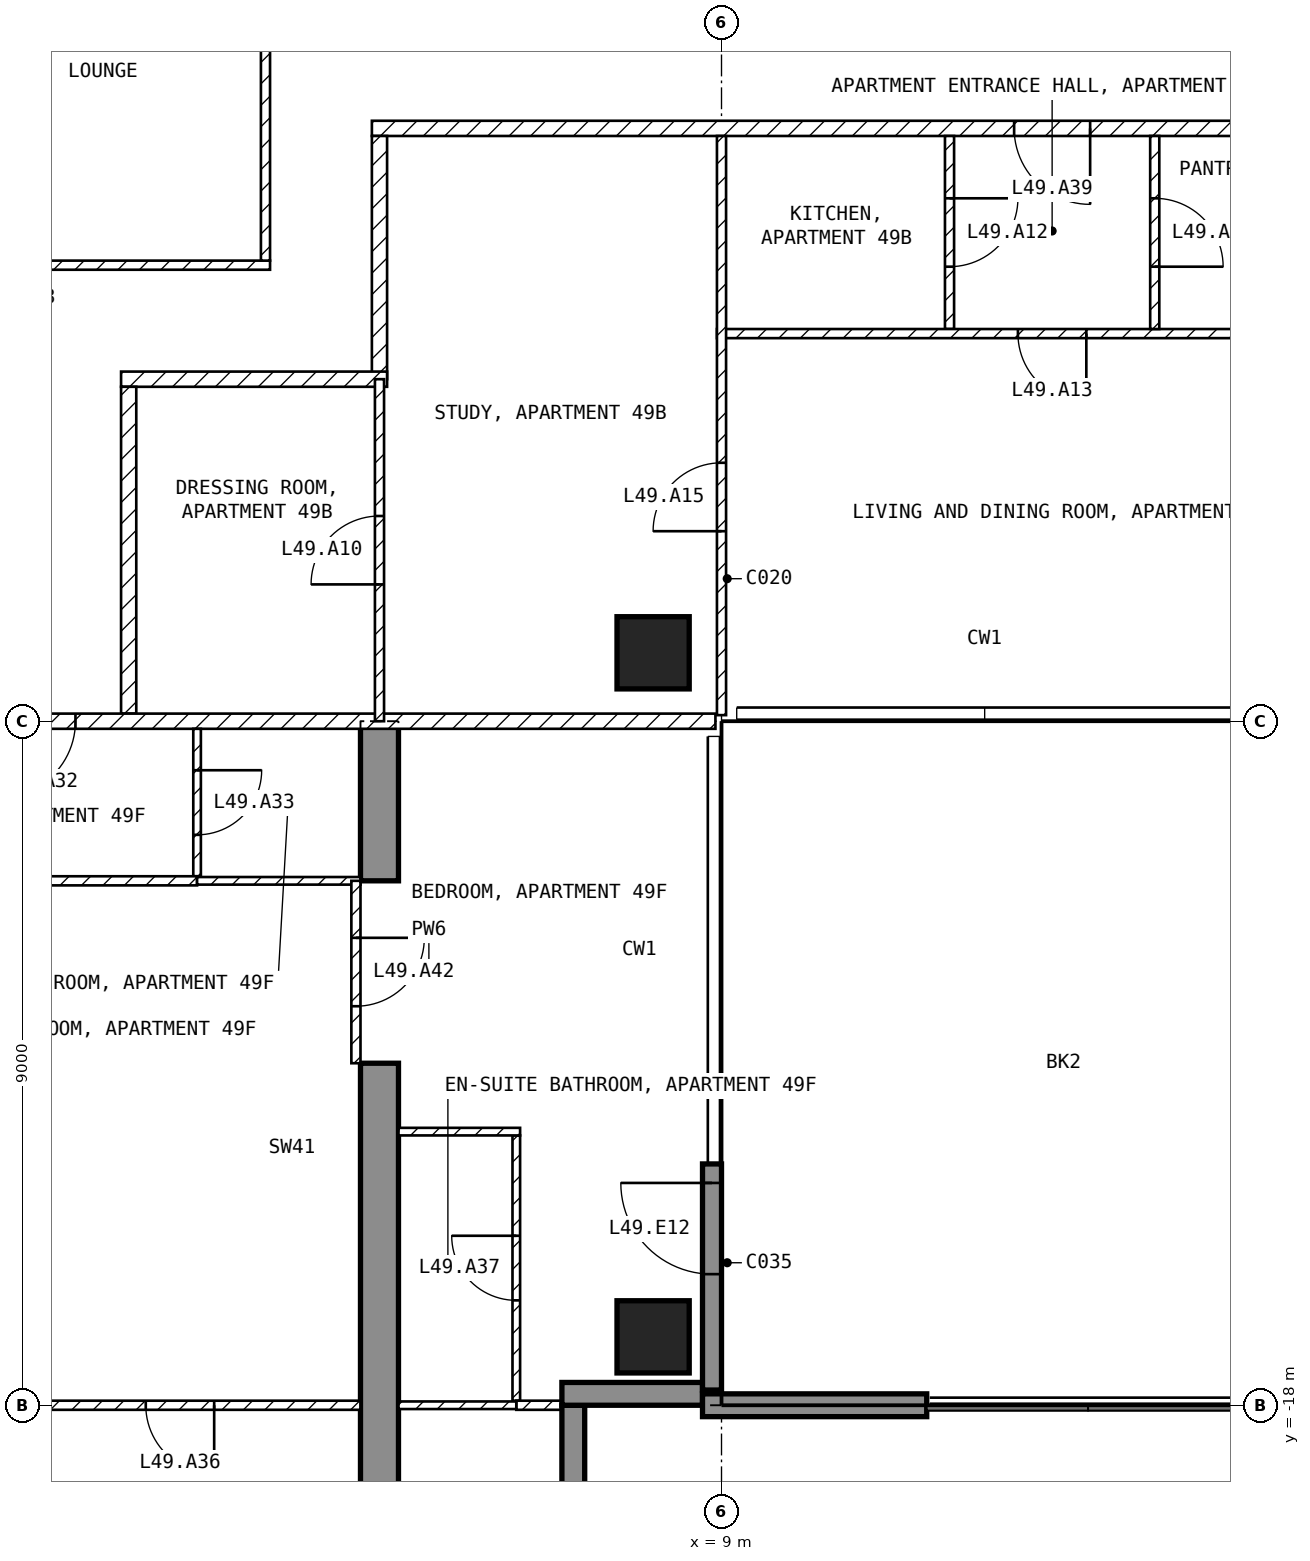
"""IFC4 building model, lengths in metres.
Left out: names, types, materials, properties, quantities, classifications, styles, units other than length and angle.
Written with IfcOpenShell. Run it as: python <this file> out.ifc"""

import sys

from ifc_helpers import new_model, si_unit, direction, frame, frame_2d, origin, origin_2d, place, context, subcontext, project, spatial, polyline, rectangle, outline, extrude, element, fill, save


model = new_model("IFC4")
c1 = context("Model", 3, precision=1e-05, world=origin(), true_north=direction((0.0, 1.0)))
c2 = subcontext(c1, "Body", "Model", "MODEL_VIEW")
j1 = project(units=[si_unit("LENGTHUNIT", "METRE"), si_unit("PLANEANGLEUNIT", "RADIAN")], contexts=[c1])
p1 = place(None, origin())
s1 = spatial("IfcSite", under=j1, at=p1, CompositionType="ELEMENT")
p2 = place(p1, origin())
s2 = spatial("IfcBuilding", under=s1, at=p2, CompositionType="ELEMENT")
p3 = place(p2, frame((0.0, 0.0, 198.1)))
s3 = spatial("IfcBuildingStorey", under=s2, at=p3, CompositionType="ELEMENT", Elevation=198.1)
for number, where, z_axis, x_axis in (
    (1, (8.1, -17.1, -0.25), (0.0, 0.0, 1.0), (1.0, 0.0, 0.0)),
    (2, (8.1, -8.1, -0.25), (0.0, 0.0, 1.0), (1.0, 0.0, 0.0)),
):
    element("IfcColumn", number, at=place(p3, frame(where, z_axis=z_axis, x_axis=x_axis)), inside=s3, PredefinedType="COLUMN", context=c2, shape_type="SweptSolid", body=[
        extrude(rectangle(XDim=0.95, YDim=0.95, at=origin_2d()), origin(), (0.0, 0.0, 1.0), 3.5),
    ])
p4 = place(p3, frame((4.25, -20.225, -0.25), z_axis=(1.0, 0.0, 0.0), x_axis=(0.0, 1.0, 0.0)))
e3 = element("IfcWall", 3, at=p4, inside=s3, PredefinedType="SHEAR", context=c2, shape_type="SweptSolid", body=[
    extrude(outline(polyline([(0.0, 0.0), (6.725, 0.0), (6.725, 2.65), (9.125, 2.65), (9.125, 0.0), (11.225, 0.0), (11.225, 3.5), (0.0, 3.5), (0.0, 0.0)])), origin(), (0.0, 0.0, 1.0), 0.5),
])
p5 = place(p3, frame((8.875, -17.8, 0.0), z_axis=(0.0, 0.0, 1.0), x_axis=(0.0, 1.0, 0.0)))
e4 = element("IfcWall", 4, at=p5, inside=s3, PredefinedType="SOLIDWALL", context=c2, shape_type="SweptSolid", body=[
    extrude(rectangle(XDim=2.975, YDim=0.25, at=frame_2d((1.488, 0.0))), origin(), (0.0, 0.0, 1.0), 3.25),
])
p6 = place(p5, frame((1.525, 0.0, 0.0)))
e5 = element("IfcOpeningElement", 5, at=p6, cuts=e4, PredefinedType="OPENING", context=c2, shape_type="SweptSolid", body=[
    extrude(rectangle(XDim=1.2, YDim=2.4, at=frame_2d((0.6, 1.2))), frame((0.0, 0.135, 0.0), z_axis=(0.0, -1.0, 0.0), x_axis=(1.0, 0.0, 0.0)), (0.0, 0.0, 1.0), 0.27),
])
p7 = place(p3, frame((7.05, -19.8, 0.0), z_axis=(0.0, 0.0, 1.0), x_axis=(0.0, 1.0, 0.0)))
e6 = element("IfcWall", 6, at=p7, inside=s3, PredefinedType="SOLIDWALL", context=c2, shape_type="SweptSolid", body=[
    extrude(rectangle(XDim=1.8, YDim=0.3, at=frame_2d((0.9, 0.0))), origin(), (0.0, 0.0, 1.0), 3.25),
])
p8 = place(p3, frame((6.9, -17.85, 0.0), z_axis=(0.0, 0.0, 1.0), x_axis=(1.0, 0.0, 0.0)))
e7 = element("IfcWall", 7, at=p8, inside=s3, PredefinedType="SOLIDWALL", context=c2, shape_type="SweptSolid", body=[
    extrude(rectangle(XDim=1.85, YDim=0.3, at=frame_2d((0.925, 0.0))), origin(), (0.0, 0.0, 1.0), 3.25),
])
p9 = place(p3, frame((8.75, -18.0, 0.0), z_axis=(0.0, 0.0, 1.0), x_axis=(1.0, 0.0, 0.0)))
e8 = element("IfcWall", 8, at=p9, inside=s3, PredefinedType="SOLIDWALL", context=c2, shape_type="SweptSolid", body=[
    extrude(rectangle(XDim=2.95, YDim=0.3, at=frame_2d((1.475, 0.0))), origin(), (0.0, 0.0, 1.0), 3.25),
])
p10 = place(p3, frame((-3.06, -3.0, 0.0), z_axis=(0.0, 0.0, 1.0), x_axis=(1.0, 0.0, 0.0)))
e9 = element("IfcWall", 9, at=p10, inside=s3, PredefinedType="PARTITIONING", context=c2, shape_type="SweptSolid", body=[
    extrude(rectangle(XDim=6.12, YDim=0.12, at=frame_2d((3.06, 0.0))), origin(), (0.0, 0.0, 1.0), 3.25),
])
p11 = place(p3, frame((3.0, -2.94, 0.0), z_axis=(0.0, 0.0, 1.0), x_axis=(0.0, 1.0, 0.0)))
e10 = element("IfcWall", 10, at=p11, inside=s3, PredefinedType="PARTITIONING", context=c2, shape_type="SweptSolid", body=[
    extrude(rectangle(XDim=5.88, YDim=0.12, at=frame_2d((2.94, 0.0))), origin(), (0.0, 0.0, 1.0), 3.25),
])
p12 = place(p3, frame((21.6, -1.2, 0.0), z_axis=(0.0, 0.0, 1.0), x_axis=(-1.0, 0.0, 0.0)))
e11 = element("IfcWall", 11, at=p12, inside=s3, PredefinedType="PARTITIONING", context=c2, shape_type="SweptSolid", body=[
    extrude(rectangle(XDim=17.2, YDim=0.2, at=frame_2d((8.6, 0.0))), origin(), (0.0, 0.0, 1.0), 3.25),
])
p13 = place(p12, frame((7.75, 0.0, 0.0)))
e12 = element("IfcOpeningElement", 12, at=p13, cuts=e11, PredefinedType="OPENING", context=c2, shape_type="SweptSolid", body=[
    extrude(rectangle(XDim=1.0, YDim=2.1, at=frame_2d((0.5, 1.05))), frame((0.0, 0.11, 0.0), z_axis=(0.0, -1.0, 0.0), x_axis=(1.0, 0.0, 0.0)), (0.0, 0.0, 1.0), 0.22),
])
p14 = place(p3, frame((4.5, -1.3, 0.0), z_axis=(0.0, 0.0, 1.0), x_axis=(0.0, -1.0, 0.0)))
e13 = element("IfcWall", 13, at=p14, inside=s3, PredefinedType="PARTITIONING", context=c2, shape_type="SweptSolid", body=[
    extrude(rectangle(XDim=3.2, YDim=0.2, at=frame_2d((1.6, 0.0))), origin(), (0.0, 0.0, 1.0), 3.25),
])
p15 = place(p3, frame((4.6, -4.5, 0.0), z_axis=(0.0, 0.0, 1.0), x_axis=(-1.0, 0.0, 0.0)))
e14 = element("IfcWall", 14, at=p15, inside=s3, PredefinedType="PARTITIONING", context=c2, shape_type="SweptSolid", body=[
    extrude(rectangle(XDim=3.5, YDim=0.2, at=frame_2d((1.75, 0.0))), origin(), (0.0, 0.0, 1.0), 3.25),
])
p16 = place(p3, frame((1.2, -4.6, 0.0), z_axis=(0.0, 0.0, 1.0), x_axis=(0.0, -1.0, 0.0)))
e15 = element("IfcWall", 15, at=p16, inside=s3, PredefinedType="PARTITIONING", context=c2, shape_type="SweptSolid", body=[
    extrude(rectangle(XDim=4.3, YDim=0.2, at=frame_2d((2.15, 0.0))), origin(), (0.0, 0.0, 1.0), 3.25),
])
p17 = place(p3, frame((8.92, -9.0, 0.0), z_axis=(0.0, 0.0, 1.0), x_axis=(-1.0, 0.0, 0.0)))
e16 = element("IfcWall", 16, at=p17, inside=s3, PredefinedType="PARTITIONING", context=c2, shape_type="SweptSolid", body=[
    extrude(rectangle(XDim=17.84, YDim=0.2, at=frame_2d((8.92, 0.0))), origin(), (0.0, 0.0, 1.0), 3.25),
])
p18 = place(p17, frame((8.42, 0.0, 0.0)))
e17 = element("IfcOpeningElement", 17, at=p18, cuts=e16, PredefinedType="OPENING", context=c2, shape_type="SweptSolid", body=[
    extrude(rectangle(XDim=1.0, YDim=2.1, at=frame_2d((0.5, 1.05))), frame((0.0, 0.11, 0.0), z_axis=(0.0, -1.0, 0.0), x_axis=(1.0, 0.0, 0.0)), (0.0, 0.0, 1.0), 0.22),
])
p19 = place(p3, frame((12.0, -1.3, 0.0), z_axis=(0.0, 0.0, 1.0), x_axis=(0.0, -1.0, 0.0)))
e18 = element("IfcWall", 18, at=p19, inside=s3, PredefinedType="PARTITIONING", context=c2, shape_type="SweptSolid", body=[
    extrude(rectangle(XDim=2.54, YDim=0.12, at=frame_2d((1.27, 0.0))), origin(), (0.0, 0.0, 1.0), 3.25),
])
p20 = place(p19, frame((0.82, 0.0, 0.0)))
e19 = element("IfcOpeningElement", 19, at=p20, cuts=e18, PredefinedType="OPENING", context=c2, shape_type="SweptSolid", body=[
    extrude(rectangle(XDim=0.9, YDim=2.1, at=frame_2d((0.45, 1.05))), frame((0.0, 0.07, 0.0), z_axis=(0.0, -1.0, 0.0), x_axis=(1.0, 0.0, 0.0)), (0.0, 0.0, 1.0), 0.14),
])
p21 = place(p3, frame((18.0, -3.9, 0.0), z_axis=(0.0, 0.0, 1.0), x_axis=(-1.0, 0.0, 0.0)))
e20 = element("IfcWall", 20, at=p21, inside=s3, PredefinedType="PARTITIONING", context=c2, shape_type="SweptSolid", body=[
    extrude(rectangle(XDim=9.06, YDim=0.12, at=frame_2d((4.53, 0.0))), origin(), (0.0, 0.0, 1.0), 3.25),
])
p22 = place(p21, frame((4.2, 0.0, 0.0)))
e21 = element("IfcOpeningElement", 21, at=p22, cuts=e20, PredefinedType="OPENING", context=c2, shape_type="SweptSolid", body=[
    extrude(rectangle(XDim=0.9, YDim=2.1, at=frame_2d((0.45, 1.05))), frame((0.0, 0.07, 0.0), z_axis=(0.0, -1.0, 0.0), x_axis=(1.0, 0.0, 0.0)), (0.0, 0.0, 1.0), 0.14),
])
p23 = place(p3, frame((9.0, -8.92, 0.0), z_axis=(0.0, 0.0, 1.0), x_axis=(0.0, 1.0, 0.0)))
e22 = element("IfcWall", 22, at=p23, inside=s3, PredefinedType="PARTITIONING", context=c2, shape_type="SweptSolid", body=[
    extrude(rectangle(XDim=7.62, YDim=0.12, at=frame_2d((3.81, 0.0))), origin(), (0.0, 0.0, 1.0), 3.25),
])
p24 = place(p23, frame((2.42, 0.0, 0.0)))
e23 = element("IfcOpeningElement", 23, at=p24, cuts=e22, PredefinedType="OPENING", context=c2, shape_type="SweptSolid", body=[
    extrude(rectangle(XDim=0.9, YDim=2.1, at=frame_2d((0.45, 1.05))), frame((0.0, 0.07, 0.0), z_axis=(0.0, -1.0, 0.0), x_axis=(1.0, 0.0, 0.0)), (0.0, 0.0, 1.0), 0.14),
])
p25 = place(p3, frame((14.7, -1.3, 0.0), z_axis=(0.0, 0.0, 1.0), x_axis=(0.0, -1.0, 0.0)))
e24 = element("IfcWall", 24, at=p25, inside=s3, PredefinedType="PARTITIONING", context=c2, shape_type="SweptSolid", body=[
    extrude(rectangle(XDim=2.54, YDim=0.12, at=frame_2d((1.27, 0.0))), origin(), (0.0, 0.0, 1.0), 3.25),
])
p26 = place(p25, frame((0.82, 0.0, 0.0)))
e25 = element("IfcOpeningElement", 25, at=p26, cuts=e24, PredefinedType="OPENING", context=c2, shape_type="SweptSolid", body=[
    extrude(rectangle(XDim=0.9, YDim=2.1, at=frame_2d((0.45, 1.05))), frame((0.0, 0.07, 0.0), z_axis=(0.0, -1.0, 0.0), x_axis=(1.0, 0.0, 0.0)), (0.0, 0.0, 1.0), 0.14),
])
p27 = place(p3, frame((4.5, -9.0, 0.0), z_axis=(0.0, 0.0, 1.0), x_axis=(0.0, 1.0, 0.0)))
e26 = element("IfcWall", 26, at=p27, inside=s3, PredefinedType="PARTITIONING", context=c2, shape_type="SweptSolid", body=[
    extrude(rectangle(XDim=4.5, YDim=0.12, at=frame_2d((2.25, 0.0))), origin(), (0.0, 0.0, 1.0), 3.25),
])
p28 = place(p27, frame((1.8, 0.0, 0.0)))
e27 = element("IfcOpeningElement", 27, at=p28, cuts=e26, PredefinedType="OPENING", context=c2, shape_type="SweptSolid", body=[
    extrude(rectangle(XDim=0.9, YDim=2.1, at=frame_2d((0.45, 1.05))), frame((0.0, 0.07, 0.0), z_axis=(0.0, -1.0, 0.0), x_axis=(1.0, 0.0, 0.0)), (0.0, 0.0, 1.0), 0.14),
])
p29 = place(p3, frame((2.1, -9.1, 0.0), z_axis=(0.0, 0.0, 1.0), x_axis=(0.0, -1.0, 0.0)))
e28 = element("IfcWall", 28, at=p29, inside=s3, PredefinedType="PARTITIONING", context=c2, shape_type="SweptSolid", body=[
    extrude(rectangle(XDim=1.94, YDim=0.1, at=frame_2d((0.97, 0.0))), origin(), (0.0, 0.0, 1.0), 3.25),
])
p30 = place(p29, frame((0.545, 0.0, 0.0)))
e29 = element("IfcOpeningElement", 29, at=p30, cuts=e28, PredefinedType="OPENING", context=c2, shape_type="SweptSolid", body=[
    extrude(rectangle(XDim=0.85, YDim=2.1, at=frame_2d((0.425, 1.05))), frame((0.0, 0.06, 0.0), z_axis=(0.0, -1.0, 0.0), x_axis=(1.0, 0.0, 0.0)), (0.0, 0.0, 1.0), 0.12),
])
p31 = place(p3, frame((2.1, -11.1, 0.0), z_axis=(0.0, 0.0, 1.0), x_axis=(-1.0, 0.0, 0.0)))
e30 = element("IfcWall", 30, at=p31, inside=s3, PredefinedType="PARTITIONING", context=c2, shape_type="SweptSolid", body=[
    extrude(rectangle(XDim=6.35, YDim=0.12, at=frame_2d((3.175, 0.0))), origin(), (0.0, 0.0, 1.0), 3.25),
])
p32 = place(p31, frame((2.725, 0.0, 0.0)))
e31 = element("IfcOpeningElement", 31, at=p32, cuts=e30, PredefinedType="OPENING", context=c2, shape_type="SweptSolid", body=[
    extrude(rectangle(XDim=0.9, YDim=2.1, at=frame_2d((0.45, 1.05))), frame((0.0, 0.07, 0.0), z_axis=(0.0, -1.0, 0.0), x_axis=(1.0, 0.0, 0.0)), (0.0, 0.0, 1.0), 0.14),
])
p33 = place(p3, frame((4.25, -11.1, 0.0), z_axis=(0.0, 0.0, 1.0), x_axis=(-1.0, 0.0, 0.0)))
e32 = element("IfcWall", 32, at=p33, inside=s3, PredefinedType="PARTITIONING", context=c2, shape_type="SweptSolid", body=[
    extrude(rectangle(XDim=2.15, YDim=0.1, at=frame_2d((1.075, 0.0))), origin(), (0.0, 0.0, 1.0), 3.25),
])
p34 = place(p3, frame((4.25, -18.0, 0.0), z_axis=(0.0, 0.0, 1.0), x_axis=(-1.0, 0.0, 0.0)))
e33 = element("IfcWall", 33, at=p34, inside=s3, PredefinedType="PARTITIONING", context=c2, shape_type="SweptSolid", body=[
    extrude(rectangle(XDim=8.5, YDim=0.12, at=frame_2d((4.25, 0.0))), origin(), (0.0, 0.0, 1.0), 3.25),
])
p35 = place(p34, frame((1.925, 0.0, 0.0)))
e34 = element("IfcOpeningElement", 34, at=p35, cuts=e33, PredefinedType="OPENING", context=c2, shape_type="SweptSolid", body=[
    extrude(rectangle(XDim=0.9, YDim=2.1, at=frame_2d((0.45, 1.05))), frame((0.0, 0.07, 0.0), z_axis=(0.0, -1.0, 0.0), x_axis=(1.0, 0.0, 0.0)), (0.0, 0.0, 1.0), 0.14),
])
p36 = place(p3, frame((6.3, -17.94, 0.0), z_axis=(0.0, 0.0, 1.0), x_axis=(0.0, 1.0, 0.0)))
e35 = element("IfcWall", 35, at=p36, inside=s3, PredefinedType="PARTITIONING", context=c2, shape_type="SweptSolid", body=[
    extrude(rectangle(XDim=3.49, YDim=0.1, at=frame_2d((1.745, 0.0))), origin(), (0.0, 0.0, 1.0), 3.25),
])
p37 = place(p36, frame((1.32, 0.0, 0.0)))
e36 = element("IfcOpeningElement", 36, at=p37, cuts=e35, PredefinedType="OPENING", context=c2, shape_type="SweptSolid", body=[
    extrude(rectangle(XDim=0.85, YDim=2.1, at=frame_2d((0.425, 1.05))), frame((0.0, 0.06, 0.0), z_axis=(0.0, -1.0, 0.0), x_axis=(1.0, 0.0, 0.0)), (0.0, 0.0, 1.0), 0.12),
])
p38 = place(p3, frame((6.35, -14.4, 0.0), z_axis=(0.0, 0.0, 1.0), x_axis=(-1.0, 0.0, 0.0)))
e37 = element("IfcWall", 37, at=p38, inside=s3, PredefinedType="PARTITIONING", context=c2, shape_type="SweptSolid", body=[
    extrude(rectangle(XDim=1.6, YDim=0.1, at=frame_2d((0.8, 0.0))), origin(), (0.0, 0.0, 1.0), 3.25),
])
p39 = place(p3, frame((7.12, -18.0, 0.0), z_axis=(0.0, 0.0, 1.0), x_axis=(-1.0, 0.0, 0.0)))
e38 = element("IfcWall", 38, at=p39, inside=s3, PredefinedType="PARTITIONING", context=c2, shape_type="SweptSolid", body=[
    extrude(rectangle(XDim=0.82, YDim=0.12, at=frame_2d((0.41, 0.0))), origin(), (0.0, 0.0, 1.0), 3.25),
])
p40 = place(p3, frame((6.3, -18.0, 0.0), z_axis=(0.0, 0.0, 1.0), x_axis=(-1.0, 0.0, 0.0)))
e39 = element("IfcWall", 39, at=p40, inside=s3, PredefinedType="PARTITIONING", context=c2, shape_type="SweptSolid", body=[
    extrude(rectangle(XDim=1.55, YDim=0.1, at=frame_2d((0.775, 0.0))), origin(), (0.0, 0.0, 1.0), 3.25),
])
p41 = place(p3, frame((4.19, -11.1, 0.0), z_axis=(0.0, 0.0, 1.0), x_axis=(0.0, -1.0, 0.0)))
e40 = element("IfcWall", 40, at=p41, inside=s3, PredefinedType="PARTITIONING", context=c2, shape_type="SweptSolid", body=[
    extrude(rectangle(XDim=2.4, YDim=0.12, at=frame_2d((1.2, 0.0))), origin(), (0.0, 0.0, 1.0), 2.4),
])
p42 = place(p41, frame((0.75, 0.0, 0.0)))
e41 = element("IfcOpeningElement", 41, at=p42, cuts=e40, PredefinedType="OPENING", context=c2, shape_type="SweptSolid", body=[
    extrude(rectangle(XDim=0.9, YDim=2.1, at=frame_2d((0.45, 1.05))), frame((0.0, 0.07, 0.0), z_axis=(0.0, -1.0, 0.0), x_axis=(1.0, 0.0, 0.0)), (0.0, 0.0, 1.0), 0.14),
])
p43 = place(p6, origin())
e42 = element("IfcDoor", 42, at=p43, inside=s3, OperationType="SINGLE_SWING_RIGHT", PredefinedType="DOOR", context=c2, shape_type="SweptSolid", body=[
    extrude(rectangle(XDim=1.2, YDim=2.4, at=frame_2d((0.6, 1.2))), frame((0.0, 0.025, 0.0), z_axis=(0.0, -1.0, 0.0), x_axis=(1.0, 0.0, 0.0)), (0.0, 0.0, 1.0), 0.05),
])
fill(e5, e42)
p44 = place(p28, origin())
e43 = element("IfcDoor", 43, at=p44, inside=s3, OperationType="SINGLE_SWING_LEFT", PredefinedType="DOOR", context=c2, shape_type="SweptSolid", body=[
    extrude(rectangle(XDim=0.9, YDim=2.1, at=frame_2d((0.45, 1.05))), frame((0.0, 0.025, 0.0), z_axis=(0.0, -1.0, 0.0), x_axis=(1.0, 0.0, 0.0)), (0.0, 0.0, 1.0), 0.05),
])
fill(e27, e43)
p45 = place(p20, origin())
e44 = element("IfcDoor", 44, at=p45, inside=s3, OperationType="SINGLE_SWING_LEFT", PredefinedType="DOOR", context=c2, shape_type="SweptSolid", body=[
    extrude(rectangle(XDim=0.9, YDim=2.1, at=frame_2d((0.45, 1.05))), frame((0.0, 0.025, 0.0), z_axis=(0.0, -1.0, 0.0), x_axis=(1.0, 0.0, 0.0)), (0.0, 0.0, 1.0), 0.05),
])
fill(e19, e44)
p46 = place(p22, origin())
e45 = element("IfcDoor", 45, at=p46, inside=s3, OperationType="SINGLE_SWING_LEFT", PredefinedType="DOOR", context=c2, shape_type="SweptSolid", body=[
    extrude(rectangle(XDim=0.9, YDim=2.1, at=frame_2d((0.45, 1.05))), frame((0.0, 0.025, 0.0), z_axis=(0.0, -1.0, 0.0), x_axis=(1.0, 0.0, 0.0)), (0.0, 0.0, 1.0), 0.05),
])
fill(e21, e45)
p47 = place(p26, origin())
e46 = element("IfcDoor", 46, at=p47, inside=s3, OperationType="SINGLE_SWING_RIGHT", PredefinedType="DOOR", context=c2, shape_type="SweptSolid", body=[
    extrude(rectangle(XDim=0.9, YDim=2.1, at=frame_2d((0.45, 1.05))), frame((0.0, 0.025, 0.0), z_axis=(0.0, -1.0, 0.0), x_axis=(1.0, 0.0, 0.0)), (0.0, 0.0, 1.0), 0.05),
])
fill(e25, e46)
p48 = place(p24, origin())
e47 = element("IfcDoor", 47, at=p48, inside=s3, OperationType="SINGLE_SWING_LEFT", PredefinedType="DOOR", context=c2, shape_type="SweptSolid", body=[
    extrude(rectangle(XDim=0.9, YDim=2.1, at=frame_2d((0.45, 1.05))), frame((0.0, 0.025, 0.0), z_axis=(0.0, -1.0, 0.0), x_axis=(1.0, 0.0, 0.0)), (0.0, 0.0, 1.0), 0.05),
])
fill(e23, e47)
p49 = place(p18, origin())
e48 = element("IfcDoor", 48, at=p49, inside=s3, OperationType="SINGLE_SWING_RIGHT", PredefinedType="DOOR", context=c2, shape_type="SweptSolid", body=[
    extrude(rectangle(XDim=1.0, YDim=2.1, at=frame_2d((0.5, 1.05))), frame((0.0, 0.025, 0.0), z_axis=(0.0, -1.0, 0.0), x_axis=(1.0, 0.0, 0.0)), (0.0, 0.0, 1.0), 0.05),
])
fill(e17, e48)
p50 = place(p30, origin())
e49 = element("IfcDoor", 49, at=p50, inside=s3, OperationType="SINGLE_SWING_LEFT", PredefinedType="DOOR", context=c2, shape_type="SweptSolid", body=[
    extrude(rectangle(XDim=0.85, YDim=2.1, at=frame_2d((0.425, 1.05))), frame((0.0, 0.025, 0.0), z_axis=(0.0, -1.0, 0.0), x_axis=(1.0, 0.0, 0.0)), (0.0, 0.0, 1.0), 0.05),
])
fill(e29, e49)
p51 = place(p35, origin())
e50 = element("IfcDoor", 50, at=p51, inside=s3, OperationType="SINGLE_SWING_LEFT", PredefinedType="DOOR", context=c2, shape_type="SweptSolid", body=[
    extrude(rectangle(XDim=0.9, YDim=2.1, at=frame_2d((0.45, 1.05))), frame((0.0, 0.025, 0.0), z_axis=(0.0, -1.0, 0.0), x_axis=(1.0, 0.0, 0.0)), (0.0, 0.0, 1.0), 0.05),
])
fill(e34, e50)
p52 = place(p37, origin())
e51 = element("IfcDoor", 51, at=p52, inside=s3, OperationType="SINGLE_SWING_RIGHT", PredefinedType="DOOR", context=c2, shape_type="SweptSolid", body=[
    extrude(rectangle(XDim=0.85, YDim=2.1, at=frame_2d((0.425, 1.05))), frame((0.0, 0.025, 0.0), z_axis=(0.0, -1.0, 0.0), x_axis=(1.0, 0.0, 0.0)), (0.0, 0.0, 1.0), 0.05),
])
fill(e36, e51)
p53 = place(p13, origin())
e52 = element("IfcDoor", 52, at=p53, inside=s3, OperationType="SINGLE_SWING_LEFT", PredefinedType="DOOR", context=c2, shape_type="SweptSolid", body=[
    extrude(rectangle(XDim=1.0, YDim=2.1, at=frame_2d((0.5, 1.05))), frame((0.0, 0.025, 0.0), z_axis=(0.0, -1.0, 0.0), x_axis=(1.0, 0.0, 0.0)), (0.0, 0.0, 1.0), 0.05),
])
fill(e12, e52)
p54 = place(p42, origin())
e53 = element("IfcDoor", 53, at=p54, inside=s3, OperationType="SINGLE_SWING_LEFT", PredefinedType="DOOR", context=c2, shape_type="SweptSolid", body=[
    extrude(rectangle(XDim=0.9, YDim=2.1, at=frame_2d((0.45, 1.05))), frame((0.0, 0.025, 0.0), z_axis=(0.0, -1.0, 0.0), x_axis=(1.0, 0.0, 0.0)), (0.0, 0.0, 1.0), 0.05),
])
fill(e41, e53)
save(model, sys.argv[1])
